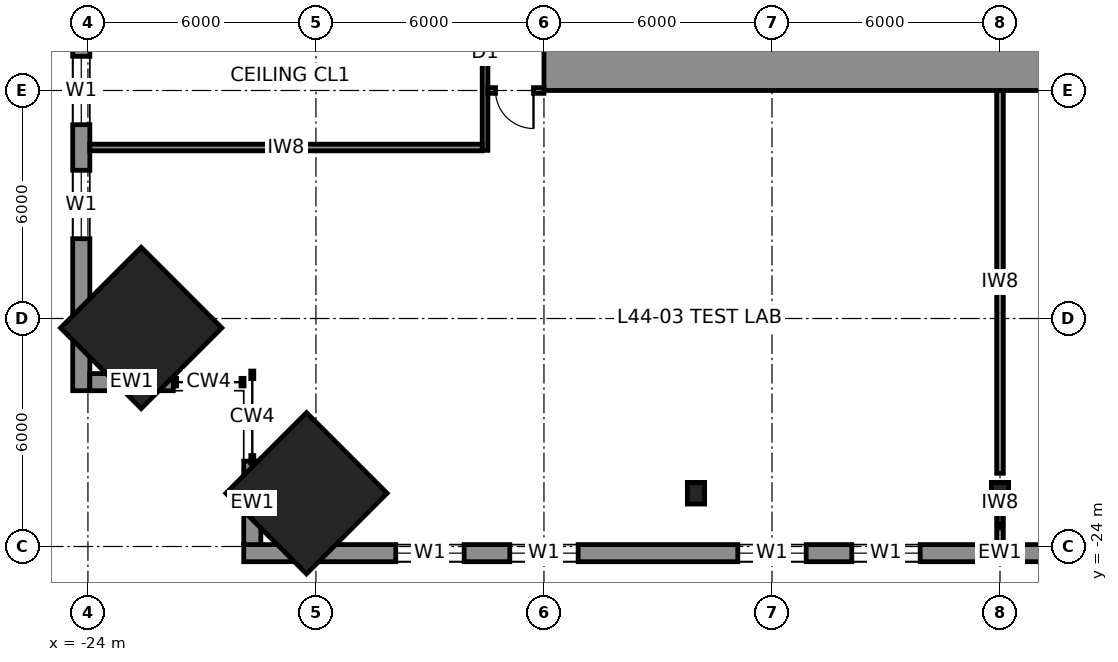
"""IFC4 building model, lengths in metres.
Left out: names, types, materials, properties, quantities, classifications, styles, units other than length and angle.
Written with IfcOpenShell. Run it as: python <this file> out.ifc"""

import sys

from ifc_helpers import new_model, si_unit, direction, frame, frame_2d, origin, origin_2d, place, context, subcontext, project, spatial, rectangle, i_section, extrude, element, fill, save


model = new_model("IFC4")
c1 = context("Model", 3, precision=1e-05, world=origin(), true_north=direction((0.0, 1.0)))
c2 = subcontext(c1, "Body", "Model", "MODEL_VIEW")
j1 = project(units=[si_unit("LENGTHUNIT", "METRE"), si_unit("PLANEANGLEUNIT", "RADIAN")], contexts=[c1])
p1 = place(None, origin())
s1 = spatial("IfcSite", under=j1, at=p1, CompositionType="ELEMENT")
p2 = place(p1, origin())
s2 = spatial("IfcBuilding", under=s1, at=p2, CompositionType="ELEMENT")
p3 = place(p2, frame((0.0, 0.0, 205.8)))
s3 = spatial("IfcBuildingStorey", under=s2, at=p3, CompositionType="ELEMENT", Elevation=205.8)
for number, where, z_axis, x_axis in (
    (1, (-18.248, -22.598, 0.0), (0.04, 0.04, 0.998), (-0.708, 0.707, 0.0)),
    (2, (-22.598, -18.248, 0.0), (0.04, 0.04, 0.998), (-0.707, 0.708, 0.0)),
):
    element("IfcColumn", number, at=place(p3, frame(where, z_axis=z_axis, x_axis=x_axis)), inside=s3, PredefinedType="COLUMN", context=c2, shape_type="SweptSolid", body=[
        extrude(rectangle(XDim=3.0, YDim=3.0, at=origin_2d()), origin(), (0.0, 0.0, 1.0), 4.007),
    ])
for number, where, z_axis, x_axis in (
    (3, (0.0, -22.598, 0.0), (0.0, 0.04, 0.999), (-1.0, 0.0, 0.0)),
    (4, (-8.0, -22.598, 0.0), (0.0, 0.04, 0.999), (-1.0, 0.0, 0.0)),
):
    element("IfcColumn", number, at=place(p3, frame(where, z_axis=z_axis, x_axis=x_axis)), inside=s3, PredefinedType="COLUMN", context=c2, shape_type="SweptSolid", body=[
        extrude(i_section(OverallWidth=0.454, OverallDepth=0.569, WebThickness=0.078, FlangeThickness=0.125, at=origin_2d()), origin(), (0.0, 0.0, 1.0), 4.003),
    ])
p4 = place(p3, frame((12.0, -11.25, 0.0), z_axis=(0.0, 0.0, 1.0), x_axis=(-1.0, 0.0, 0.0)))
e5 = element("IfcWall", 5, at=p4, inside=s3, PredefinedType="SHEAR", context=c2, shape_type="SweptSolid", body=[
    extrude(rectangle(XDim=24.0, YDim=1.5, at=frame_2d((12.0, 0.0))), origin(), (0.0, 0.0, 1.0), 4.0),
])
p5 = place(p3, frame((-19.9, -24.175, 0.0), z_axis=(0.0, 0.0, 1.0), x_axis=(1.0, 0.0, 0.0)))
e6 = element("IfcWall", 6, at=p5, inside=s3, PredefinedType="SOLIDWALL", context=c2, shape_type="SweptSolid", body=[
    extrude(rectangle(XDim=39.8, YDim=0.45, at=frame_2d((19.9, 0.0))), origin(), (0.0, 0.0, 1.0), 3.83),
])
p6 = place(p5, frame((4.0, 0.0, 0.7)))
e7 = element("IfcOpeningElement", 7, at=p6, cuts=e6, PredefinedType="OPENING", context=c2, shape_type="SweptSolid", body=[
    extrude(rectangle(XDim=1.8, YDim=2.6, at=frame_2d((0.9, 1.3))), frame((0.0, 0.235, 0.0), z_axis=(0.0, -1.0, 0.0), x_axis=(1.0, 0.0, 0.0)), (0.0, 0.0, 1.0), 0.47),
])
p7 = place(p5, frame((7.0, 0.0, 0.7)))
e8 = element("IfcOpeningElement", 8, at=p7, cuts=e6, PredefinedType="OPENING", context=c2, shape_type="SweptSolid", body=[
    extrude(rectangle(XDim=1.8, YDim=2.6, at=frame_2d((0.9, 1.3))), frame((0.0, 0.235, 0.0), z_axis=(0.0, -1.0, 0.0), x_axis=(1.0, 0.0, 0.0)), (0.0, 0.0, 1.0), 0.47),
])
p8 = place(p5, frame((13.0, 0.0, 0.7)))
e9 = element("IfcOpeningElement", 9, at=p8, cuts=e6, PredefinedType="OPENING", context=c2, shape_type="SweptSolid", body=[
    extrude(rectangle(XDim=1.8, YDim=2.6, at=frame_2d((0.9, 1.3))), frame((0.0, 0.235, 0.0), z_axis=(0.0, -1.0, 0.0), x_axis=(1.0, 0.0, 0.0)), (0.0, 0.0, 1.0), 0.47),
])
p9 = place(p5, frame((16.0, 0.0, 0.7)))
e10 = element("IfcOpeningElement", 10, at=p9, cuts=e6, PredefinedType="OPENING", context=c2, shape_type="SweptSolid", body=[
    extrude(rectangle(XDim=1.8, YDim=2.6, at=frame_2d((0.9, 1.3))), frame((0.0, 0.235, 0.0), z_axis=(0.0, -1.0, 0.0), x_axis=(1.0, 0.0, 0.0)), (0.0, 0.0, 1.0), 0.47),
])
p10 = place(p5, frame((22.0, 0.0, 0.7)))
e11 = element("IfcOpeningElement", 11, at=p10, cuts=e6, PredefinedType="OPENING", context=c2, shape_type="SweptSolid", body=[
    extrude(rectangle(XDim=1.8, YDim=2.6, at=frame_2d((0.9, 1.3))), frame((0.0, 0.235, 0.0), z_axis=(0.0, -1.0, 0.0), x_axis=(1.0, 0.0, 0.0)), (0.0, 0.0, 1.0), 0.47),
])
p11 = place(p5, frame((25.0, 0.0, 0.7)))
e12 = element("IfcOpeningElement", 12, at=p11, cuts=e6, PredefinedType="OPENING", context=c2, shape_type="SweptSolid", body=[
    extrude(rectangle(XDim=1.8, YDim=2.6, at=frame_2d((0.9, 1.3))), frame((0.0, 0.235, 0.0), z_axis=(0.0, -1.0, 0.0), x_axis=(1.0, 0.0, 0.0)), (0.0, 0.0, 1.0), 0.47),
])
p12 = place(p5, frame((31.0, 0.0, 0.7)))
e13 = element("IfcOpeningElement", 13, at=p12, cuts=e6, PredefinedType="OPENING", context=c2, shape_type="SweptSolid", body=[
    extrude(rectangle(XDim=1.8, YDim=2.6, at=frame_2d((0.9, 1.3))), frame((0.0, 0.235, 0.0), z_axis=(0.0, -1.0, 0.0), x_axis=(1.0, 0.0, 0.0)), (0.0, 0.0, 1.0), 0.47),
])
p13 = place(p5, frame((34.0, 0.0, 0.7)))
e14 = element("IfcOpeningElement", 14, at=p13, cuts=e6, PredefinedType="OPENING", context=c2, shape_type="SweptSolid", body=[
    extrude(rectangle(XDim=1.8, YDim=2.6, at=frame_2d((0.9, 1.3))), frame((0.0, 0.235, 0.0), z_axis=(0.0, -1.0, 0.0), x_axis=(1.0, 0.0, 0.0)), (0.0, 0.0, 1.0), 0.47),
])
p14 = place(p3, frame((-24.175, 19.9, 0.0), z_axis=(0.0, 0.0, 1.0), x_axis=(0.0, -1.0, 0.0)))
e15 = element("IfcWall", 15, at=p14, inside=s3, PredefinedType="SOLIDWALL", context=c2, shape_type="SweptSolid", body=[
    extrude(rectangle(XDim=39.8, YDim=0.45, at=frame_2d((19.9, 0.0))), origin(), (0.0, 0.0, 1.0), 3.83),
])
p15 = place(p14, frame((4.0, 0.0, 0.7)))
e16 = element("IfcOpeningElement", 16, at=p15, cuts=e15, PredefinedType="OPENING", context=c2, shape_type="SweptSolid", body=[
    extrude(rectangle(XDim=1.8, YDim=2.6, at=frame_2d((0.9, 1.3))), frame((0.0, 0.235, 0.0), z_axis=(0.0, -1.0, 0.0), x_axis=(1.0, 0.0, 0.0)), (0.0, 0.0, 1.0), 0.47),
])
p16 = place(p14, frame((7.0, 0.0, 0.7)))
e17 = element("IfcOpeningElement", 17, at=p16, cuts=e15, PredefinedType="OPENING", context=c2, shape_type="SweptSolid", body=[
    extrude(rectangle(XDim=1.8, YDim=2.6, at=frame_2d((0.9, 1.3))), frame((0.0, 0.235, 0.0), z_axis=(0.0, -1.0, 0.0), x_axis=(1.0, 0.0, 0.0)), (0.0, 0.0, 1.0), 0.47),
])
p17 = place(p14, frame((13.0, 0.0, 0.7)))
e18 = element("IfcOpeningElement", 18, at=p17, cuts=e15, PredefinedType="OPENING", context=c2, shape_type="SweptSolid", body=[
    extrude(rectangle(XDim=1.8, YDim=2.6, at=frame_2d((0.9, 1.3))), frame((0.0, 0.235, 0.0), z_axis=(0.0, -1.0, 0.0), x_axis=(1.0, 0.0, 0.0)), (0.0, 0.0, 1.0), 0.47),
])
p18 = place(p14, frame((16.0, 0.0, 0.7)))
e19 = element("IfcOpeningElement", 19, at=p18, cuts=e15, PredefinedType="OPENING", context=c2, shape_type="SweptSolid", body=[
    extrude(rectangle(XDim=1.8, YDim=2.6, at=frame_2d((0.9, 1.3))), frame((0.0, 0.235, 0.0), z_axis=(0.0, -1.0, 0.0), x_axis=(1.0, 0.0, 0.0)), (0.0, 0.0, 1.0), 0.47),
])
p19 = place(p14, frame((22.0, 0.0, 0.7)))
e20 = element("IfcOpeningElement", 20, at=p19, cuts=e15, PredefinedType="OPENING", context=c2, shape_type="SweptSolid", body=[
    extrude(rectangle(XDim=1.8, YDim=2.6, at=frame_2d((0.9, 1.3))), frame((0.0, 0.235, 0.0), z_axis=(0.0, -1.0, 0.0), x_axis=(1.0, 0.0, 0.0)), (0.0, 0.0, 1.0), 0.47),
])
p20 = place(p14, frame((25.0, 0.0, 0.7)))
e21 = element("IfcOpeningElement", 21, at=p20, cuts=e15, PredefinedType="OPENING", context=c2, shape_type="SweptSolid", body=[
    extrude(rectangle(XDim=1.8, YDim=2.6, at=frame_2d((0.9, 1.3))), frame((0.0, 0.235, 0.0), z_axis=(0.0, -1.0, 0.0), x_axis=(1.0, 0.0, 0.0)), (0.0, 0.0, 1.0), 0.47),
])
p21 = place(p14, frame((31.0, 0.0, 0.7)))
e22 = element("IfcOpeningElement", 22, at=p21, cuts=e15, PredefinedType="OPENING", context=c2, shape_type="SweptSolid", body=[
    extrude(rectangle(XDim=1.8, YDim=2.6, at=frame_2d((0.9, 1.3))), frame((0.0, 0.235, 0.0), z_axis=(0.0, -1.0, 0.0), x_axis=(1.0, 0.0, 0.0)), (0.0, 0.0, 1.0), 0.47),
])
p22 = place(p14, frame((34.0, 0.0, 0.7)))
e23 = element("IfcOpeningElement", 23, at=p22, cuts=e15, PredefinedType="OPENING", context=c2, shape_type="SweptSolid", body=[
    extrude(rectangle(XDim=1.8, YDim=2.6, at=frame_2d((0.9, 1.3))), frame((0.0, 0.235, 0.0), z_axis=(0.0, -1.0, 0.0), x_axis=(1.0, 0.0, 0.0)), (0.0, 0.0, 1.0), 0.47),
])
for number, where, z_axis, x_axis in (
    (24, (-19.675, -21.754, 0.0), (0.0, 0.0, 1.0), (0.0, -1.0, 0.0)),
    (25, (-21.754, -19.675, 0.0), (0.0, 0.0, 1.0), (-1.0, 0.0, 0.0)),
):
    element("IfcWall", number, at=place(p3, frame(where, z_axis=z_axis, x_axis=x_axis)), inside=s3, PredefinedType="SOLIDWALL", context=c2, shape_type="SweptSolid", body=[
        extrude(rectangle(XDim=2.196, YDim=0.45, at=frame_2d((1.098, 0.0))), origin(), (0.0, 0.0, 1.0), 3.83),
    ])
p23 = place(p3, frame((-13.55, 13.575, 0.0), z_axis=(0.0, 0.0, 1.0), x_axis=(0.0, -1.0, 0.0)))
e26 = element("IfcWall", 26, at=p23, inside=s3, PredefinedType="PARTITIONING", context=c2, shape_type="SweptSolid", body=[
    extrude(rectangle(XDim=27.15, YDim=0.15, at=frame_2d((13.575, 0.0))), origin(), (0.0, 0.0, 1.0), 3.83),
])
p24 = place(p23, frame((22.975, 0.0, 0.0)))
e27 = element("IfcOpeningElement", 27, at=p24, cuts=e26, PredefinedType="OPENING", context=c2, shape_type="SweptSolid", body=[
    extrude(rectangle(XDim=1.0, YDim=2.3, at=frame_2d((0.5, 1.15))), frame((0.0, 0.085, 0.0), z_axis=(0.0, -1.0, 0.0), x_axis=(1.0, 0.0, 0.0)), (0.0, 0.0, 1.0), 0.17),
])
p25 = place(p23, frame((19.775, 0.0, 0.0)))
e28 = element("IfcOpeningElement", 28, at=p25, cuts=e26, PredefinedType="OPENING", context=c2, shape_type="SweptSolid", body=[
    extrude(rectangle(XDim=1.0, YDim=2.3, at=frame_2d((0.5, 1.15))), frame((0.0, 0.085, 0.0), z_axis=(0.0, -1.0, 0.0), x_axis=(1.0, 0.0, 0.0)), (0.0, 0.0, 1.0), 0.17),
])
p26 = place(p23, frame((11.525, 0.0, 0.0)))
e29 = element("IfcOpeningElement", 29, at=p26, cuts=e26, PredefinedType="OPENING", context=c2, shape_type="SweptSolid", body=[
    extrude(rectangle(XDim=1.0, YDim=2.3, at=frame_2d((0.5, 1.15))), frame((0.0, 0.085, 0.0), z_axis=(0.0, -1.0, 0.0), x_axis=(1.0, 0.0, 0.0)), (0.0, 0.0, 1.0), 0.17),
])
p27 = place(p23, frame((3.175, 0.0, 0.0)))
e30 = element("IfcOpeningElement", 30, at=p27, cuts=e26, PredefinedType="OPENING", context=c2, shape_type="SweptSolid", body=[
    extrude(rectangle(XDim=1.0, YDim=2.3, at=frame_2d((0.5, 1.15))), frame((0.0, 0.085, 0.0), z_axis=(0.0, -1.0, 0.0), x_axis=(1.0, 0.0, 0.0)), (0.0, 0.0, 1.0), 0.17),
])
p28 = place(p23, frame((16.825, 0.0, 0.0)))
e31 = element("IfcOpeningElement", 31, at=p28, cuts=e26, PredefinedType="OPENING", context=c2, shape_type="SweptSolid", body=[
    extrude(rectangle(XDim=1.0, YDim=2.3, at=frame_2d((0.5, 1.15))), frame((0.0, 0.085, 0.0), z_axis=(0.0, -1.0, 0.0), x_axis=(1.0, 0.0, 0.0)), (0.0, 0.0, 1.0), 0.17),
])
p29 = place(p23, frame((8.325, 0.0, 0.0)))
e32 = element("IfcOpeningElement", 32, at=p29, cuts=e26, PredefinedType="OPENING", context=c2, shape_type="SweptSolid", body=[
    extrude(rectangle(XDim=1.0, YDim=2.3, at=frame_2d((0.5, 1.15))), frame((0.0, 0.085, 0.0), z_axis=(0.0, -1.0, 0.0), x_axis=(1.0, 0.0, 0.0)), (0.0, 0.0, 1.0), 0.17),
])
p30 = place(p3, frame((-12.0, -12.0, 0.0), z_axis=(0.0, 0.0, 1.0), x_axis=(-1.0, 0.0, 0.0)))
e33 = element("IfcWall", 33, at=p30, inside=s3, PredefinedType="PARTITIONING", context=c2, shape_type="SweptSolid", body=[
    extrude(rectangle(XDim=1.475, YDim=0.15, at=frame_2d((0.738, 0.0))), origin(), (0.0, 0.0, 1.0), 3.83),
])
p31 = place(p30, frame((0.275, 0.0, 0.0)))
e34 = element("IfcOpeningElement", 34, at=p31, cuts=e33, PredefinedType="OPENING", context=c2, shape_type="SweptSolid", body=[
    extrude(rectangle(XDim=1.0, YDim=2.3, at=frame_2d((0.5, 1.15))), frame((0.0, 0.085, 0.0), z_axis=(0.0, -1.0, 0.0), x_axis=(1.0, 0.0, 0.0)), (0.0, 0.0, 1.0), 0.17),
])
p32 = place(p3, frame((-13.625, -13.5, 0.0), z_axis=(0.0, 0.0, 1.0), x_axis=(-1.0, 0.0, 0.0)))
e35 = element("IfcWall", 35, at=p32, inside=s3, PredefinedType="PARTITIONING", context=c2, shape_type="SweptSolid", body=[
    extrude(rectangle(XDim=10.325, YDim=0.175, at=frame_2d((5.163, 0.0))), origin(), (0.0, 0.0, 1.0), 3.83),
])
p33 = place(p3, frame((0.0, -12.0, 0.0), z_axis=(0.0, 0.0, 1.0), x_axis=(0.0, -1.0, 0.0)))
e36 = element("IfcWall", 36, at=p33, inside=s3, PredefinedType="PARTITIONING", context=c2, shape_type="SweptSolid", body=[
    extrude(rectangle(XDim=10.073, YDim=0.175, at=frame_2d((5.037, 0.0))), origin(), (0.0, 0.0, 1.0), 3.04),
])
p34 = place(p3, frame((0.0, -22.962, 0.0), z_axis=(0.0, 0.0, 1.0), x_axis=(0.0, -1.0, 0.0)))
e37 = element("IfcWall", 37, at=p34, inside=s3, PredefinedType="PARTITIONING", context=c2, shape_type="SweptSolid", body=[
    extrude(rectangle(XDim=0.988, YDim=0.175, at=frame_2d((0.494, 0.0))), origin(), (0.0, 0.0, 1.0), 3.83),
])
p35 = place(p6, origin())
e38 = element("IfcWindow", 38, at=p35, inside=s3, PartitioningType="SINGLE_PANEL", PredefinedType="WINDOW", context=c2, shape_type="SweptSolid", body=[
    extrude(rectangle(XDim=1.8, YDim=2.6, at=frame_2d((0.9, 1.3))), frame((0.0, 0.03, 0.0), z_axis=(0.0, -1.0, 0.0), x_axis=(1.0, 0.0, 0.0)), (0.0, 0.0, 1.0), 0.06),
])
fill(e7, e38)
p36 = place(p7, origin())
e39 = element("IfcWindow", 39, at=p36, inside=s3, PartitioningType="SINGLE_PANEL", PredefinedType="WINDOW", context=c2, shape_type="SweptSolid", body=[
    extrude(rectangle(XDim=1.8, YDim=2.6, at=frame_2d((0.9, 1.3))), frame((0.0, 0.03, 0.0), z_axis=(0.0, -1.0, 0.0), x_axis=(1.0, 0.0, 0.0)), (0.0, 0.0, 1.0), 0.06),
])
fill(e8, e39)
p37 = place(p8, origin())
e40 = element("IfcWindow", 40, at=p37, inside=s3, PartitioningType="SINGLE_PANEL", PredefinedType="WINDOW", context=c2, shape_type="SweptSolid", body=[
    extrude(rectangle(XDim=1.8, YDim=2.6, at=frame_2d((0.9, 1.3))), frame((0.0, 0.03, 0.0), z_axis=(0.0, -1.0, 0.0), x_axis=(1.0, 0.0, 0.0)), (0.0, 0.0, 1.0), 0.06),
])
fill(e9, e40)
p38 = place(p9, origin())
e41 = element("IfcWindow", 41, at=p38, inside=s3, PartitioningType="SINGLE_PANEL", PredefinedType="WINDOW", context=c2, shape_type="SweptSolid", body=[
    extrude(rectangle(XDim=1.8, YDim=2.6, at=frame_2d((0.9, 1.3))), frame((0.0, 0.03, 0.0), z_axis=(0.0, -1.0, 0.0), x_axis=(1.0, 0.0, 0.0)), (0.0, 0.0, 1.0), 0.06),
])
fill(e10, e41)
p39 = place(p21, origin())
e42 = element("IfcWindow", 42, at=p39, inside=s3, PartitioningType="SINGLE_PANEL", PredefinedType="WINDOW", context=c2, shape_type="SweptSolid", body=[
    extrude(rectangle(XDim=1.8, YDim=2.6, at=frame_2d((0.9, 1.3))), frame((0.0, 0.03, 0.0), z_axis=(0.0, -1.0, 0.0), x_axis=(1.0, 0.0, 0.0)), (0.0, 0.0, 1.0), 0.06),
])
fill(e22, e42)
p40 = place(p22, origin())
e43 = element("IfcWindow", 43, at=p40, inside=s3, PartitioningType="SINGLE_PANEL", PredefinedType="WINDOW", context=c2, shape_type="SweptSolid", body=[
    extrude(rectangle(XDim=1.8, YDim=2.6, at=frame_2d((0.9, 1.3))), frame((0.0, 0.03, 0.0), z_axis=(0.0, -1.0, 0.0), x_axis=(1.0, 0.0, 0.0)), (0.0, 0.0, 1.0), 0.06),
])
fill(e23, e43)
p41 = place(p31, origin())
e44 = element("IfcDoor", 44, at=p41, inside=s3, OperationType="SINGLE_SWING_LEFT", PredefinedType="DOOR", context=c2, shape_type="SweptSolid", body=[
    extrude(rectangle(XDim=1.0, YDim=2.3, at=frame_2d((0.5, 1.15))), frame((0.0, 0.025, 0.0), z_axis=(0.0, -1.0, 0.0), x_axis=(1.0, 0.0, 0.0)), (0.0, 0.0, 1.0), 0.05),
])
fill(e34, e44)
save(model, sys.argv[1])
